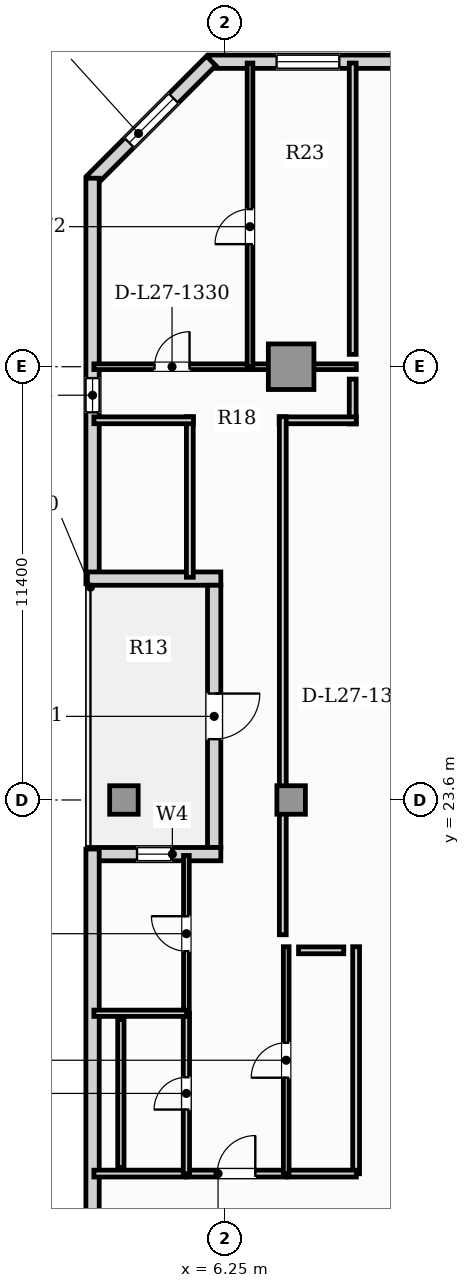
"""IFC4 building model, lengths in metres.
Left out: names, types, materials, properties, quantities, classifications, styles, units other than length and angle.
Written with IfcOpenShell. Run it as: python <this file> out.ifc"""

import sys

from ifc_helpers import new_model, si_unit, direction, frame, frame_2d, origin, origin_2d, place, context, subcontext, project, spatial, rectangle, hollow_rectangle, extrude, element, fill, save


model = new_model("IFC4")
c1 = context("Model", 3, precision=1e-05, world=origin(), true_north=direction((0.0, 1.0)))
c2 = subcontext(c1, "Body", "Model", "MODEL_VIEW")
j1 = project(units=[si_unit("LENGTHUNIT", "METRE"), si_unit("PLANEANGLEUNIT", "RADIAN")], contexts=[c1])
p1 = place(None, origin())
s1 = spatial("IfcSite", under=j1, at=p1, CompositionType="ELEMENT")
p2 = place(p1, origin())
s2 = spatial("IfcBuilding", under=s1, at=p2, CompositionType="ELEMENT")
p3 = place(p2, frame((0.0, 0.0, 111.85)))
s3 = spatial("IfcBuildingStorey", under=s2, at=p3, CompositionType="ELEMENT", Elevation=111.85)
p4 = place(p3, frame((8.0, 35.0, 0.0), z_axis=(0.0, 0.0, 1.0), x_axis=(1.0, 0.0, 0.0)))
e1 = element("IfcColumn", 1, at=p4, inside=s3, PredefinedType="USERDEFINED", context=c2, shape_type="SweptSolid", body=[
    extrude(hollow_rectangle(XDim=1.2, YDim=1.2, WallThickness=0.07, at=origin_2d()), origin(), (0.0, 0.0, 1.0), 3.85),
])
for number, where, z_axis, x_axis in (
    (2, (3.6, 23.6, 0.0), (0.0, 0.0, 1.0), (1.0, 0.0, 0.0)),
    (3, (8.0, 23.6, 0.0), (0.0, 0.0, 1.0), (1.0, 0.0, 0.0)),
):
    element("IfcColumn", number, at=place(p3, frame(where, z_axis=z_axis, x_axis=x_axis)), inside=s3, PredefinedType="COLUMN", context=c2, shape_type="SweptSolid", body=[
        extrude(rectangle(XDim=0.75, YDim=0.75, at=origin_2d()), origin(), (0.0, 0.0, 1.0), 3.85),
    ])
p5 = place(p3, frame((51.66, 43.025, 0.0), z_axis=(0.0, 0.0, 1.0), x_axis=(-1.0, 0.0, 0.0)))
e4 = element("IfcWall", 4, at=p5, inside=s3, PredefinedType="SOLIDWALL", context=c2, shape_type="SweptSolid", body=[
    extrude(rectangle(XDim=45.82, YDim=0.35, at=frame_2d((22.91, 0.0))), origin(), (0.0, 0.0, 1.0), 3.6),
])
p6 = place(p5, frame((42.393, 0.0, 0.88)))
e5 = element("IfcOpeningElement", 5, at=p6, cuts=e4, PredefinedType="OPENING", context=c2, shape_type="SweptSolid", body=[
    extrude(rectangle(XDim=1.65, YDim=2.0, at=frame_2d((0.825, 1.0))), frame((0.0, 0.185, 0.0), z_axis=(0.0, -1.0, 0.0), x_axis=(1.0, 0.0, 0.0)), (0.0, 0.0, 1.0), 0.37),
])
p7 = place(p5, frame((1.778, 0.0, 0.88)))
e6 = element("IfcOpeningElement", 6, at=p7, cuts=e4, PredefinedType="OPENING", context=c2, shape_type="SweptSolid", body=[
    extrude(rectangle(XDim=1.65, YDim=2.0, at=frame_2d((0.825, 1.0))), frame((0.0, 0.185, 0.0), z_axis=(0.0, -1.0, 0.0), x_axis=(1.0, 0.0, 0.0)), (0.0, 0.0, 1.0), 0.37),
])
p8 = place(p5, frame((37.293, 0.0, 0.88)))
e7 = element("IfcOpeningElement", 7, at=p8, cuts=e4, PredefinedType="OPENING", context=c2, shape_type="SweptSolid", body=[
    extrude(rectangle(XDim=1.65, YDim=2.0, at=frame_2d((0.825, 1.0))), frame((0.0, 0.185, 0.0), z_axis=(0.0, -1.0, 0.0), x_axis=(1.0, 0.0, 0.0)), (0.0, 0.0, 1.0), 0.37),
])
p9 = place(p5, frame((34.694, 0.0, 0.95)))
e8 = element("IfcOpeningElement", 8, at=p9, cuts=e4, PredefinedType="OPENING", context=c2, shape_type="SweptSolid", body=[
    extrude(rectangle(XDim=0.9, YDim=1.5, at=frame_2d((0.45, 0.75))), frame((0.0, 0.185, 0.0), z_axis=(0.0, -1.0, 0.0), x_axis=(1.0, 0.0, 0.0)), (0.0, 0.0, 1.0), 0.37),
])
p10 = place(p5, frame((31.734, 0.0, 1.82)))
e9 = element("IfcOpeningElement", 9, at=p10, cuts=e4, PredefinedType="OPENING", context=c2, shape_type="SweptSolid", body=[
    extrude(rectangle(XDim=0.9, YDim=1.05, at=frame_2d((0.45, 0.525))), frame((0.0, 0.185, 0.0), z_axis=(0.0, -1.0, 0.0), x_axis=(1.0, 0.0, 0.0)), (0.0, 0.0, 1.0), 0.37),
])
p11 = place(p5, frame((29.11, 0.0, 0.88)))
e10 = element("IfcOpeningElement", 10, at=p11, cuts=e4, PredefinedType="OPENING", context=c2, shape_type="SweptSolid", body=[
    extrude(rectangle(XDim=1.65, YDim=2.0, at=frame_2d((0.825, 1.0))), frame((0.0, 0.185, 0.0), z_axis=(0.0, -1.0, 0.0), x_axis=(1.0, 0.0, 0.0)), (0.0, 0.0, 1.0), 0.37),
])
p12 = place(p5, frame((26.053, 0.0, 0.88)))
e11 = element("IfcOpeningElement", 11, at=p12, cuts=e4, PredefinedType="OPENING", context=c2, shape_type="SweptSolid", body=[
    extrude(rectangle(XDim=1.65, YDim=2.0, at=frame_2d((0.825, 1.0))), frame((0.0, 0.185, 0.0), z_axis=(0.0, -1.0, 0.0), x_axis=(1.0, 0.0, 0.0)), (0.0, 0.0, 1.0), 0.37),
])
p13 = place(p5, frame((23.243, 0.0, 0.88)))
e12 = element("IfcOpeningElement", 12, at=p13, cuts=e4, PredefinedType="OPENING", context=c2, shape_type="SweptSolid", body=[
    extrude(rectangle(XDim=1.65, YDim=2.0, at=frame_2d((0.825, 1.0))), frame((0.0, 0.185, 0.0), z_axis=(0.0, -1.0, 0.0), x_axis=(1.0, 0.0, 0.0)), (0.0, 0.0, 1.0), 0.37),
])
p14 = place(p5, frame((20.844, 0.0, 0.88)))
e13 = element("IfcOpeningElement", 13, at=p14, cuts=e4, PredefinedType="OPENING", context=c2, shape_type="SweptSolid", body=[
    extrude(rectangle(XDim=1.65, YDim=2.0, at=frame_2d((0.825, 1.0))), frame((0.0, 0.185, 0.0), z_axis=(0.0, -1.0, 0.0), x_axis=(1.0, 0.0, 0.0)), (0.0, 0.0, 1.0), 0.37),
])
p15 = place(p5, frame((18.034, 0.0, 0.88)))
e14 = element("IfcOpeningElement", 14, at=p15, cuts=e4, PredefinedType="OPENING", context=c2, shape_type="SweptSolid", body=[
    extrude(rectangle(XDim=1.65, YDim=2.0, at=frame_2d((0.825, 1.0))), frame((0.0, 0.185, 0.0), z_axis=(0.0, -1.0, 0.0), x_axis=(1.0, 0.0, 0.0)), (0.0, 0.0, 1.0), 0.37),
])
p16 = place(p5, frame((14.813, 0.0, 0.88)))
e15 = element("IfcOpeningElement", 15, at=p16, cuts=e4, PredefinedType="OPENING", context=c2, shape_type="SweptSolid", body=[
    extrude(rectangle(XDim=1.65, YDim=2.0, at=frame_2d((0.825, 1.0))), frame((0.0, 0.185, 0.0), z_axis=(0.0, -1.0, 0.0), x_axis=(1.0, 0.0, 0.0)), (0.0, 0.0, 1.0), 0.37),
])
p17 = place(p5, frame((11.839, 0.0, 0.88)))
e16 = element("IfcOpeningElement", 16, at=p17, cuts=e4, PredefinedType="OPENING", context=c2, shape_type="SweptSolid", body=[
    extrude(rectangle(XDim=1.65, YDim=2.0, at=frame_2d((0.825, 1.0))), frame((0.0, 0.185, 0.0), z_axis=(0.0, -1.0, 0.0), x_axis=(1.0, 0.0, 0.0)), (0.0, 0.0, 1.0), 0.37),
])
p18 = place(p5, frame((9.276, 0.0, 0.88)))
e17 = element("IfcOpeningElement", 17, at=p18, cuts=e4, PredefinedType="OPENING", context=c2, shape_type="SweptSolid", body=[
    extrude(rectangle(XDim=1.65, YDim=2.0, at=frame_2d((0.825, 1.0))), frame((0.0, 0.185, 0.0), z_axis=(0.0, -1.0, 0.0), x_axis=(1.0, 0.0, 0.0)), (0.0, 0.0, 1.0), 0.37),
])
p19 = place(p5, frame((6.63, 0.0, 0.88)))
e18 = element("IfcOpeningElement", 18, at=p19, cuts=e4, PredefinedType="OPENING", context=c2, shape_type="SweptSolid", body=[
    extrude(rectangle(XDim=1.65, YDim=2.0, at=frame_2d((0.825, 1.0))), frame((0.0, 0.185, 0.0), z_axis=(0.0, -1.0, 0.0), x_axis=(1.0, 0.0, 0.0)), (0.0, 0.0, 1.0), 0.37),
])
p20 = place(p3, frame((5.896, 43.048, 0.0), z_axis=(0.0, 0.0, 1.0), x_axis=(-0.707106781187, -0.707106781187, 0.0)))
e19 = element("IfcWall", 19, at=p20, inside=s3, PredefinedType="SOLIDWALL", context=c2, shape_type="SweptSolid", body=[
    extrude(rectangle(XDim=4.446, YDim=0.35, at=frame_2d((2.223, 0.0))), origin(), (0.0, 0.0, 1.0), 3.6),
])
p21 = place(p20, frame((1.398, 0.0, 0.88)))
e20 = element("IfcOpeningElement", 20, at=p21, cuts=e19, PredefinedType="OPENING", context=c2, shape_type="SweptSolid", body=[
    extrude(rectangle(XDim=1.65, YDim=2.0, at=frame_2d((0.825, 1.0))), frame((0.0, 0.185, 0.0), z_axis=(0.0, -1.0, 0.0), x_axis=(1.0, 0.0, 0.0)), (0.0, 0.0, 1.0), 0.37),
])
p22 = place(p3, frame((2.775, 39.96, 0.0), z_axis=(0.0, 0.0, 1.0), x_axis=(0.0, -1.0, 0.0)))
e21 = element("IfcWall", 21, at=p22, inside=s3, PredefinedType="SOLIDWALL", context=c2, shape_type="SweptSolid", body=[
    extrude(rectangle(XDim=10.67, YDim=0.35, at=frame_2d((5.335, 0.0))), origin(), (0.0, 0.0, 1.0), 3.6),
])
p23 = place(p22, frame((5.26, 0.0, 0.95)))
e22 = element("IfcOpeningElement", 22, at=p23, cuts=e21, PredefinedType="OPENING", context=c2, shape_type="SweptSolid", body=[
    extrude(rectangle(XDim=0.9, YDim=1.5, at=frame_2d((0.45, 0.75))), frame((0.0, 0.185, 0.0), z_axis=(0.0, -1.0, 0.0), x_axis=(1.0, 0.0, 0.0)), (0.0, 0.0, 1.0), 0.37),
])
p24 = place(p3, frame((2.64, 29.425, 0.0), z_axis=(0.0, 0.0, 1.0), x_axis=(1.0, 0.0, 0.0)))
e23 = element("IfcWall", 23, at=p24, inside=s3, PredefinedType="SOLIDWALL", context=c2, shape_type="SweptSolid", body=[
    extrude(rectangle(XDim=3.51, YDim=0.35, at=frame_2d((1.755, 0.0))), origin(), (0.0, 0.0, 1.0), 3.6),
])
p25 = place(p3, frame((5.975, 29.25, 0.0), z_axis=(0.0, 0.0, 1.0), x_axis=(0.0, -1.0, 0.0)))
e24 = element("IfcWall", 24, at=p25, inside=s3, PredefinedType="SOLIDWALL", context=c2, shape_type="SweptSolid", body=[
    extrude(rectangle(XDim=6.9, YDim=0.35, at=frame_2d((3.45, 0.0))), origin(), (0.0, 0.0, 1.0), 3.6),
])
p26 = place(p25, frame((2.85, 0.0, 0.0)))
e25 = element("IfcOpeningElement", 25, at=p26, cuts=e24, PredefinedType="OPENING", context=c2, shape_type="SweptSolid", body=[
    extrude(rectangle(XDim=1.2, YDim=2.2, at=frame_2d((0.6, 1.1))), frame((0.0, 0.185, 0.0), z_axis=(0.0, -1.0, 0.0), x_axis=(1.0, 0.0, 0.0)), (0.0, 0.0, 1.0), 0.37),
])
p27 = place(p3, frame((6.15, 22.175, 0.0), z_axis=(0.0, 0.0, 1.0), x_axis=(-1.0, 0.0, 0.0)))
e26 = element("IfcWall", 26, at=p27, inside=s3, PredefinedType="SOLIDWALL", context=c2, shape_type="SweptSolid", body=[
    extrude(rectangle(XDim=3.51, YDim=0.35, at=frame_2d((1.755, 0.0))), origin(), (0.0, 0.0, 1.0), 3.6),
])
p28 = place(p27, frame((1.305, 0.0, 0.95)))
e27 = element("IfcOpeningElement", 27, at=p28, cuts=e26, PredefinedType="OPENING", context=c2, shape_type="SweptSolid", body=[
    extrude(rectangle(XDim=0.9, YDim=1.5, at=frame_2d((0.45, 0.75))), frame((0.0, 0.185, 0.0), z_axis=(0.0, -1.0, 0.0), x_axis=(1.0, 0.0, 0.0)), (0.0, 0.0, 1.0), 0.37),
])
p29 = place(p3, frame((2.775, 22.31, 0.0), z_axis=(0.0, 0.0, 1.0), x_axis=(0.0, -1.0, 0.0)))
e28 = element("IfcWall", 28, at=p29, inside=s3, PredefinedType="SOLIDWALL", context=c2, shape_type="SweptSolid", body=[
    extrude(rectangle(XDim=19.07, YDim=0.35, at=frame_2d((9.535, 0.0))), origin(), (0.0, 0.0, 1.0), 3.6),
])
p30 = place(p3, frame((5.239, 13.77, 0.0), z_axis=(0.0, 0.0, 1.0), x_axis=(1.0, 0.0, 0.0)))
e29 = element("IfcWall", 29, at=p30, inside=s3, PredefinedType="PARTITIONING", context=c2, shape_type="SweptSolid", body=[
    extrude(rectangle(XDim=2.636, YDim=0.18, at=frame_2d((1.318, 0.0))), origin(), (0.0, 0.0, 1.0), 3.6),
])
p31 = place(p30, frame((0.818, 0.0, 0.0)))
e30 = element("IfcOpeningElement", 30, at=p31, cuts=e29, PredefinedType="OPENING", context=c2, shape_type="SweptSolid", body=[
    extrude(rectangle(XDim=1.0, YDim=2.15, at=frame_2d((0.5, 1.075))), frame((0.0, 0.1, 0.0), z_axis=(0.0, -1.0, 0.0), x_axis=(1.0, 0.0, 0.0)), (0.0, 0.0, 1.0), 0.2),
])
p32 = place(p3, frame((2.81, 13.77, 0.0), z_axis=(0.0, 0.0, 1.0), x_axis=(1.0, 0.0, 0.0)))
e31 = element("IfcWall", 31, at=p32, inside=s3, PredefinedType="PARTITIONING", context=c2, shape_type="SweptSolid", body=[
    extrude(rectangle(XDim=2.399, YDim=0.18, at=frame_2d((1.2, 0.0))), origin(), (0.0, 0.0, 1.0), 3.6),
])
p33 = place(p3, frame((9.71, 13.765, 0.0), z_axis=(0.0, 0.0, 1.0), x_axis=(0.0, 1.0, 0.0)))
e32 = element("IfcWall", 32, at=p33, inside=s3, PredefinedType="PARTITIONING", context=c2, shape_type="SweptSolid", body=[
    extrude(rectangle(XDim=5.974, YDim=0.18, at=frame_2d((2.987, 0.0))), origin(), (0.0, 0.0, 1.0), 3.6),
])
p34 = place(p3, frame((7.905, 13.77, 0.0), z_axis=(0.0, 0.0, 1.0), x_axis=(1.0, 0.0, 0.0)))
e33 = element("IfcWall", 33, at=p34, inside=s3, PredefinedType="PARTITIONING", context=c2, shape_type="SweptSolid", body=[
    extrude(rectangle(XDim=1.81, YDim=0.18, at=frame_2d((0.905, 0.0))), origin(), (0.0, 0.0, 1.0), 3.6),
])
p35 = place(p3, frame((5.244, 13.765, 0.0), z_axis=(0.0, 0.0, 1.0), x_axis=(0.0, 1.0, 0.0)))
e34 = element("IfcWall", 34, at=p35, inside=s3, PredefinedType="PLUMBINGWALL", context=c2, shape_type="SweptSolid", body=[
    extrude(rectangle(XDim=4.229, YDim=0.165, at=frame_2d((2.114, 0.0))), origin(), (0.0, 0.0, 1.0), 3.6),
])
p36 = place(p35, frame((1.689, 0.0, 0.0)))
e35 = element("IfcOpeningElement", 35, at=p36, cuts=e34, PredefinedType="OPENING", context=c2, shape_type="SweptSolid", body=[
    extrude(rectangle(XDim=0.85, YDim=2.1, at=frame_2d((0.425, 1.05))), frame((0.0, 0.093, 0.0), z_axis=(0.0, -1.0, 0.0), x_axis=(1.0, 0.0, 0.0)), (0.0, 0.0, 1.0), 0.185),
])
p37 = place(p3, frame((5.244, 18.023, 0.0), z_axis=(0.0, 0.0, 1.0), x_axis=(0.0, 1.0, 0.0)))
e36 = element("IfcWall", 36, at=p37, inside=s3, PredefinedType="PARTITIONING", context=c2, shape_type="SweptSolid", body=[
    extrude(rectangle(XDim=4.116, YDim=0.15, at=frame_2d((2.058, 0.0))), origin(), (0.0, 0.0, 1.0), 3.6),
])
p38 = place(p37, frame((1.598, 0.0, 0.0)))
e37 = element("IfcOpeningElement", 37, at=p38, cuts=e36, PredefinedType="OPENING", context=c2, shape_type="SweptSolid", body=[
    extrude(rectangle(XDim=0.92, YDim=2.1, at=frame_2d((0.46, 1.05))), frame((0.0, 0.085, 0.0), z_axis=(0.0, -1.0, 0.0), x_axis=(1.0, 0.0, 0.0)), (0.0, 0.0, 1.0), 0.17),
])
p39 = place(p3, frame((7.87, 13.765, 0.0), z_axis=(0.0, 0.0, 1.0), x_axis=(0.0, 1.0, 0.0)))
e38 = element("IfcWall", 38, at=p39, inside=s3, PredefinedType="PARTITIONING", context=c2, shape_type="SweptSolid", body=[
    extrude(rectangle(XDim=5.974, YDim=0.15, at=frame_2d((2.987, 0.0))), origin(), (0.0, 0.0, 1.0), 3.055),
])
p40 = place(p39, frame((2.527, 0.0, 0.0)))
e39 = element("IfcOpeningElement", 39, at=p40, cuts=e38, PredefinedType="OPENING", context=c2, shape_type="SweptSolid", body=[
    extrude(rectangle(XDim=0.92, YDim=2.1, at=frame_2d((0.46, 1.05))), frame((0.0, 0.085, 0.0), z_axis=(0.0, -1.0, 0.0), x_axis=(1.0, 0.0, 0.0)), (0.0, 0.0, 1.0), 0.17),
])
p41 = place(p3, frame((2.81, 35.0, 0.0), z_axis=(0.0, 0.0, 1.0), x_axis=(1.0, 0.0, 0.0)))
e40 = element("IfcWall", 40, at=p41, inside=s3, PredefinedType="PARTITIONING", context=c2, shape_type="SweptSolid", body=[
    extrude(rectangle(XDim=4.113, YDim=0.15, at=frame_2d((2.057, 0.0))), origin(), (0.0, 0.0, 1.0), 3.6),
])
p42 = place(p41, frame((1.597, 0.0, 0.0)))
e41 = element("IfcOpeningElement", 41, at=p42, cuts=e40, PredefinedType="OPENING", context=c2, shape_type="SweptSolid", body=[
    extrude(rectangle(XDim=0.92, YDim=2.1, at=frame_2d((0.46, 1.05))), frame((0.0, 0.085, 0.0), z_axis=(0.0, -1.0, 0.0), x_axis=(1.0, 0.0, 0.0)), (0.0, 0.0, 1.0), 0.17),
])
p43 = place(p3, frame((6.953, 35.0, 0.0), z_axis=(0.0, 0.0, 1.0), x_axis=(1.0, 0.0, 0.0)))
e42 = element("IfcWall", 42, at=p43, inside=s3, PredefinedType="PARTITIONING", context=c2, shape_type="SweptSolid", body=[
    extrude(rectangle(XDim=2.762, YDim=0.15, at=frame_2d((1.381, 0.0))), origin(), (0.0, 0.0, 1.0), 2.983),
])
p44 = place(p3, frame((2.81, 17.988, 0.0), z_axis=(0.0, 0.0, 1.0), x_axis=(1.0, 0.0, 0.0)))
e43 = element("IfcWall", 43, at=p44, inside=s3, PredefinedType="PLUMBINGWALL", context=c2, shape_type="SweptSolid", body=[
    extrude(rectangle(XDim=2.439, YDim=0.165, at=frame_2d((1.22, 0.0))), origin(), (0.0, 0.0, 1.0), 3.6),
])
p45 = place(p3, frame((6.918, 34.995, 0.0), z_axis=(0.0, 0.0, 1.0), x_axis=(0.0, 1.0, 0.0)))
e44 = element("IfcWall", 44, at=p45, inside=s3, PredefinedType="PARTITIONING", context=c2, shape_type="SweptSolid", body=[
    extrude(rectangle(XDim=7.995, YDim=0.15, at=frame_2d((3.998, 0.0))), origin(), (0.0, 0.0, 1.0), 3.6),
])
p46 = place(p45, frame((3.23, 0.0, 0.0)))
e45 = element("IfcOpeningElement", 45, at=p46, cuts=e44, PredefinedType="OPENING", context=c2, shape_type="SweptSolid", body=[
    extrude(rectangle(XDim=0.92, YDim=2.1, at=frame_2d((0.46, 1.05))), frame((0.0, 0.085, 0.0), z_axis=(0.0, -1.0, 0.0), x_axis=(1.0, 0.0, 0.0)), (0.0, 0.0, 1.0), 0.17),
])
p47 = place(p3, frame((5.334, 29.46, 0.0), z_axis=(0.0, 0.0, 1.0), x_axis=(0.0, 1.0, 0.0)))
e46 = element("IfcWall", 46, at=p47, inside=s3, PredefinedType="PARTITIONING", context=c2, shape_type="SweptSolid", body=[
    extrude(rectangle(XDim=4.225, YDim=0.18, at=frame_2d((2.113, 0.0))), origin(), (0.0, 0.0, 1.0), 3.6),
])
p48 = place(p3, frame((5.429, 33.59, 0.0), z_axis=(0.0, 0.0, 1.0), x_axis=(-1.0, 0.0, 0.0)))
e47 = element("IfcWall", 47, at=p48, inside=s3, PredefinedType="PARTITIONING", context=c2, shape_type="SweptSolid", body=[
    extrude(rectangle(XDim=2.619, YDim=0.18, at=frame_2d((1.31, 0.0))), origin(), (0.0, 0.0, 1.0), 3.6),
])
p49 = place(p3, frame((9.62, 34.675, 0.0), z_axis=(0.0, 0.0, 1.0), x_axis=(0.0, -1.0, 0.0)))
e48 = element("IfcWall", 48, at=p49, inside=s3, PredefinedType="PARTITIONING", context=c2, shape_type="SweptSolid", body=[
    extrude(rectangle(XDim=1.18, YDim=0.18, at=frame_2d((0.59, 0.0))), origin(), (0.0, 0.0, 1.0), 3.6),
])
p50 = place(p3, frame((9.715, 33.59, 0.0), z_axis=(0.0, 0.0, 1.0), x_axis=(-1.0, 0.0, 0.0)))
e49 = element("IfcWall", 49, at=p50, inside=s3, PredefinedType="PARTITIONING", context=c2, shape_type="SweptSolid", body=[
    extrude(rectangle(XDim=2.03, YDim=0.18, at=frame_2d((1.015, 0.0))), origin(), (0.0, 0.0, 1.0), 3.6),
])
p51 = place(p3, frame((7.78, 33.685, 0.0), z_axis=(0.0, 0.0, 1.0), x_axis=(0.0, -1.0, 0.0)))
e50 = element("IfcWall", 50, at=p51, inside=s3, PredefinedType="PARTITIONING", context=c2, shape_type="SweptSolid", body=[
    extrude(rectangle(XDim=13.631, YDim=0.18, at=frame_2d((6.815, 0.0))), origin(), (0.0, 0.0, 1.0), 3.055),
])
p52 = place(p3, frame((3.52, 13.935, 0.0), z_axis=(0.0, 0.0, 1.0), x_axis=(0.0, 1.0, 0.0)))
e51 = element("IfcWall", 51, at=p52, inside=s3, PredefinedType="PLUMBINGWALL", context=c2, shape_type="SweptSolid", body=[
    extrude(rectangle(XDim=3.888, YDim=0.165, at=frame_2d((1.944, 0.0))), origin(), (0.0, 0.0, 1.0), 3.6),
])
p53 = place(p3, frame((8.195, 19.644, 0.0), z_axis=(0.0, 0.0, 1.0), x_axis=(1.0, 0.0, 0.0)))
e52 = element("IfcWall", 52, at=p53, inside=s3, PredefinedType="PARTITIONING", context=c2, shape_type="SweptSolid", body=[
    extrude(rectangle(XDim=1.19, YDim=0.18, at=frame_2d((0.595, 0.0))), origin(), (0.0, 0.0, 1.0), 3.6),
])
p54 = place(p3, frame((9.62, 42.99, 0.0), z_axis=(0.0, 0.0, 1.0), x_axis=(0.0, -1.0, 0.0)))
e53 = element("IfcWall", 53, at=p54, inside=s3, PredefinedType="PARTITIONING", context=c2, shape_type="SweptSolid", body=[
    extrude(rectangle(XDim=7.665, YDim=0.18, at=frame_2d((3.833, 0.0))), origin(), (0.0, 0.0, 1.0), 3.6),
])
p55 = place(p26, frame((1.2, 0.0, 0.0), z_axis=(0.0, 0.0, 1.0), x_axis=(-1.0, 0.0, 0.0)))
e54 = element("IfcDoor", 54, at=p55, inside=s3, OperationType="SINGLE_SWING_RIGHT", PredefinedType="DOOR", context=c2, shape_type="SweptSolid", body=[
    extrude(rectangle(XDim=1.2, YDim=2.2, at=frame_2d((0.6, 1.1))), frame((0.0, 0.025, 0.0), z_axis=(0.0, -1.0, 0.0), x_axis=(1.0, 0.0, 0.0)), (0.0, 0.0, 1.0), 0.05),
])
fill(e25, e54)
p56 = place(p23, origin())
e55 = element("IfcWindow", 55, at=p56, inside=s3, PartitioningType="SINGLE_PANEL", PredefinedType="WINDOW", context=c2, shape_type="SweptSolid", body=[
    extrude(rectangle(XDim=0.9, YDim=1.5, at=frame_2d((0.45, 0.75))), frame((0.0, 0.03, 0.0), z_axis=(0.0, -1.0, 0.0), x_axis=(1.0, 0.0, 0.0)), (0.0, 0.0, 1.0), 0.06),
])
fill(e22, e55)
p57 = place(p28, origin())
e56 = element("IfcWindow", 56, at=p57, inside=s3, PartitioningType="SINGLE_PANEL", PredefinedType="WINDOW", context=c2, shape_type="SweptSolid", body=[
    extrude(rectangle(XDim=0.9, YDim=1.5, at=frame_2d((0.45, 0.75))), frame((0.0, 0.03, 0.0), z_axis=(0.0, -1.0, 0.0), x_axis=(1.0, 0.0, 0.0)), (0.0, 0.0, 1.0), 0.06),
])
fill(e27, e56)
p58 = place(p21, origin())
e57 = element("IfcWindow", 57, at=p58, inside=s3, PartitioningType="SINGLE_PANEL", PredefinedType="WINDOW", context=c2, shape_type="SweptSolid", body=[
    extrude(rectangle(XDim=1.65, YDim=2.0, at=frame_2d((0.825, 1.0))), frame((0.0, 0.03, 0.0), z_axis=(0.0, -1.0, 0.0), x_axis=(1.0, 0.0, 0.0)), (0.0, 0.0, 1.0), 0.06),
])
fill(e20, e57)
p59 = place(p6, origin())
e58 = element("IfcWindow", 58, at=p59, inside=s3, PartitioningType="SINGLE_PANEL", PredefinedType="WINDOW", context=c2, shape_type="SweptSolid", body=[
    extrude(rectangle(XDim=1.65, YDim=2.0, at=frame_2d((0.825, 1.0))), frame((0.0, 0.03, 0.0), z_axis=(0.0, -1.0, 0.0), x_axis=(1.0, 0.0, 0.0)), (0.0, 0.0, 1.0), 0.06),
])
fill(e5, e58)
p60 = place(p31, origin())
e59 = element("IfcDoor", 59, at=p60, inside=s3, OperationType="SINGLE_SWING_RIGHT", PredefinedType="DOOR", context=c2, shape_type="SweptSolid", body=[
    extrude(rectangle(XDim=1.0, YDim=2.15, at=frame_2d((0.5, 1.075))), frame((0.0, 0.025, 0.0), z_axis=(0.0, -1.0, 0.0), x_axis=(1.0, 0.0, 0.0)), (0.0, 0.0, 1.0), 0.05),
])
fill(e30, e59)
p61 = place(p36, origin())
e60 = element("IfcDoor", 60, at=p61, inside=s3, OperationType="SINGLE_SWING_LEFT", PredefinedType="DOOR", context=c2, shape_type="SweptSolid", body=[
    extrude(rectangle(XDim=0.85, YDim=2.1, at=frame_2d((0.425, 1.05))), frame((0.0, 0.025, 0.0), z_axis=(0.0, -1.0, 0.0), x_axis=(1.0, 0.0, 0.0)), (0.0, 0.0, 1.0), 0.05),
])
fill(e35, e60)
p62 = place(p38, origin())
e61 = element("IfcDoor", 61, at=p62, inside=s3, OperationType="SINGLE_SWING_RIGHT", PredefinedType="DOOR", context=c2, shape_type="SweptSolid", body=[
    extrude(rectangle(XDim=0.92, YDim=2.1, at=frame_2d((0.46, 1.05))), frame((0.0, 0.025, 0.0), z_axis=(0.0, -1.0, 0.0), x_axis=(1.0, 0.0, 0.0)), (0.0, 0.0, 1.0), 0.05),
])
fill(e37, e61)
p63 = place(p40, origin())
e62 = element("IfcDoor", 62, at=p63, inside=s3, OperationType="SINGLE_SWING_LEFT", PredefinedType="DOOR", context=c2, shape_type="SweptSolid", body=[
    extrude(rectangle(XDim=0.92, YDim=2.1, at=frame_2d((0.46, 1.05))), frame((0.0, 0.025, 0.0), z_axis=(0.0, -1.0, 0.0), x_axis=(1.0, 0.0, 0.0)), (0.0, 0.0, 1.0), 0.05),
])
fill(e39, e62)
p64 = place(p42, origin())
e63 = element("IfcDoor", 63, at=p64, inside=s3, OperationType="SINGLE_SWING_RIGHT", PredefinedType="DOOR", context=c2, shape_type="SweptSolid", body=[
    extrude(rectangle(XDim=0.92, YDim=2.1, at=frame_2d((0.46, 1.05))), frame((0.0, 0.025, 0.0), z_axis=(0.0, -1.0, 0.0), x_axis=(1.0, 0.0, 0.0)), (0.0, 0.0, 1.0), 0.05),
])
fill(e41, e63)
p65 = place(p46, origin())
e64 = element("IfcDoor", 64, at=p65, inside=s3, OperationType="SINGLE_SWING_LEFT", PredefinedType="DOOR", context=c2, shape_type="SweptSolid", body=[
    extrude(rectangle(XDim=0.92, YDim=2.1, at=frame_2d((0.46, 1.05))), frame((0.0, 0.025, 0.0), z_axis=(0.0, -1.0, 0.0), x_axis=(1.0, 0.0, 0.0)), (0.0, 0.0, 1.0), 0.05),
])
fill(e45, e64)
save(model, sys.argv[1])
